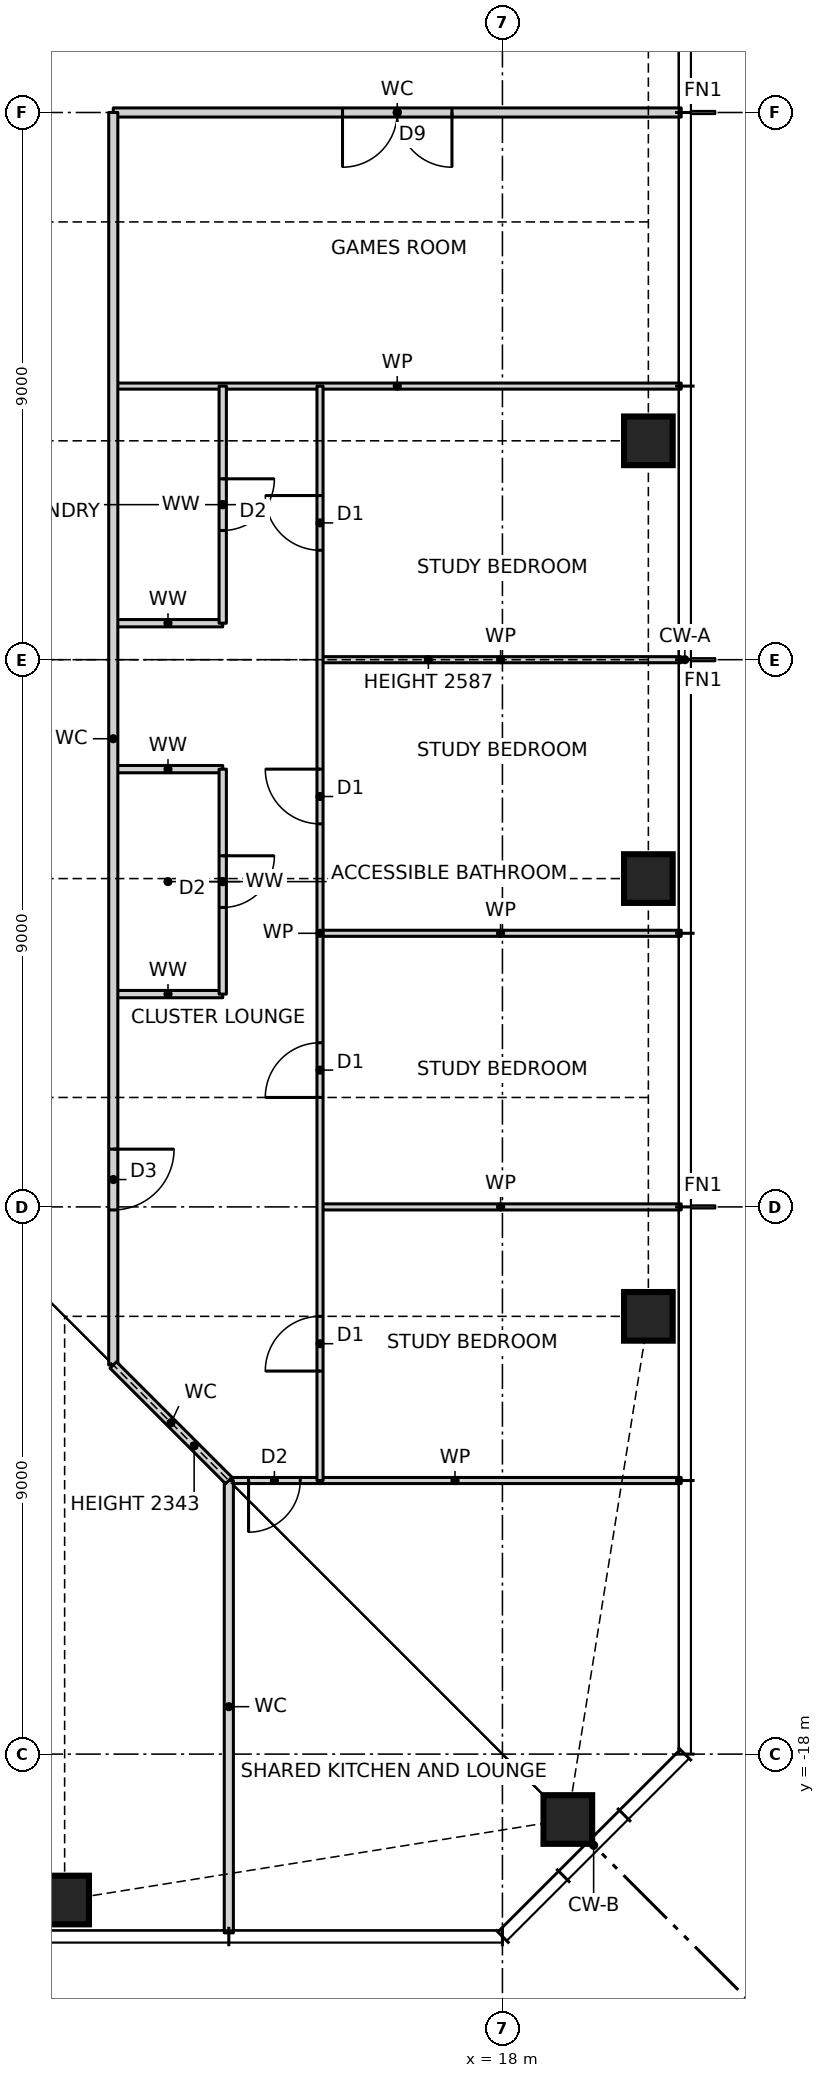
"""IFC4 building model, lengths in metres.
Left out: names, types, materials, properties, quantities, classifications, styles, units other than length and angle.
Written with IfcOpenShell. Run it as: python <this file> out.ifc"""

import sys

from ifc_helpers import new_model, si_unit, direction, frame, frame_2d, origin, origin_2d, place, context, subcontext, project, spatial, rectangle, hollow_rectangle, extrude, element, fill, save


model = new_model("IFC4")
c1 = context("Model", 3, precision=1e-05, world=origin(), true_north=direction((0.0, 1.0)))
c2 = subcontext(c1, "Body", "Model", "MODEL_VIEW")
j1 = project(units=[si_unit("LENGTHUNIT", "METRE"), si_unit("PLANEANGLEUNIT", "RADIAN")], contexts=[c1])
p1 = place(None, origin())
s1 = spatial("IfcSite", under=j1, at=p1, CompositionType="ELEMENT")
p2 = place(p1, origin())
s2 = spatial("IfcBuilding", under=s1, at=p2, CompositionType="ELEMENT")
p3 = place(p2, frame((0.0, 0.0, 112.0)))
s3 = spatial("IfcBuildingStorey", under=s2, at=p3, CompositionType="ELEMENT", Elevation=112.0)
for number, where, z_axis, x_axis in (
    (1, (10.8, -20.4, 0.0), (0.0, 0.0, 1.0), (1.0, 0.0, 0.0)),
    (2, (19.076, -19.076, 0.0), (0.0, 0.0, 1.0), (1.0, 0.0, 0.0)),
    (3, (20.4, -10.8, 0.0), (0.0, 0.0, 1.0), (1.0, 0.0, 0.0)),
    (4, (20.4, -3.6, 0.0), (0.0, 0.0, 1.0), (1.0, 0.0, 0.0)),
    (5, (20.4, 3.6, 0.0), (0.0, 0.0, 1.0), (1.0, 0.0, 0.0)),
):
    element("IfcColumn", number, at=place(p3, frame(where, z_axis=z_axis, x_axis=x_axis)), inside=s3, PredefinedType="COLUMN", context=c2, shape_type="SweptSolid", body=[
        extrude(hollow_rectangle(XDim=0.8, YDim=0.8, WallThickness=0.07, at=origin_2d()), origin(), (0.0, 0.0, 1.0), 3.5),
    ])
p4 = place(p3, frame((13.5, -13.5, 0.0), z_axis=(0.0, 0.0, 1.0), x_axis=(1.0, 0.0, 0.0)))
e6 = element("IfcWall", 6, at=p4, inside=s3, PredefinedType="PARTITIONING", context=c2, shape_type="SweptSolid", body=[
    extrude(rectangle(XDim=7.44, YDim=0.1, at=frame_2d((3.72, 0.0))), origin(), (0.0, 0.0, 1.0), 3.27),
])
p5 = place(p4, frame((0.325, 0.0, 0.0)))
e7 = element("IfcOpeningElement", 7, at=p5, cuts=e6, PredefinedType="OPENING", context=c2, shape_type="SweptSolid", body=[
    extrude(rectangle(XDim=0.85, YDim=2.1, at=frame_2d((0.425, 1.05))), frame((0.0, 0.06, 0.0), z_axis=(0.0, -1.0, 0.0), x_axis=(1.0, 0.0, 0.0)), (0.0, 0.0, 1.0), 0.12),
])
p6 = place(p3, frame((15.0, -9.0, 0.0), z_axis=(0.0, 0.0, 1.0), x_axis=(1.0, 0.0, 0.0)))
e8 = element("IfcWall", 8, at=p6, inside=s3, PredefinedType="PARTITIONING", context=c2, shape_type="SweptSolid", body=[
    extrude(rectangle(XDim=5.94, YDim=0.1, at=frame_2d((2.97, 0.0))), origin(), (0.0, 0.0, 1.0), 3.27),
])
p7 = place(p3, frame((11.6, -5.5, 0.0), z_axis=(0.0, 0.0, 1.0), x_axis=(1.0, 0.0, 0.0)))
e9 = element("IfcWall", 9, at=p7, inside=s3, PredefinedType="PARTITIONING", context=c2, shape_type="SweptSolid", body=[
    extrude(rectangle(XDim=1.8, YDim=0.12, at=frame_2d((0.9, 0.0))), origin(), (0.0, 0.0, 1.0), 3.27),
])
p8 = place(p3, frame((15.0, -4.5, 0.0), z_axis=(0.0, 0.0, 1.0), x_axis=(1.0, 0.0, 0.0)))
e10 = element("IfcWall", 10, at=p8, inside=s3, PredefinedType="PARTITIONING", context=c2, shape_type="SweptSolid", body=[
    extrude(rectangle(XDim=5.94, YDim=0.1, at=frame_2d((2.97, 0.0))), origin(), (0.0, 0.0, 1.0), 3.27),
])
p9 = place(p3, frame((11.6, -1.8, 0.0), z_axis=(0.0, 0.0, 1.0), x_axis=(1.0, 0.0, 0.0)))
e11 = element("IfcWall", 11, at=p9, inside=s3, PredefinedType="PARTITIONING", context=c2, shape_type="SweptSolid", body=[
    extrude(rectangle(XDim=1.8, YDim=0.12, at=frame_2d((0.9, 0.0))), origin(), (0.0, 0.0, 1.0), 3.27),
])
p10 = place(p3, frame((15.0, 0.0, 0.0), z_axis=(0.0, 0.0, 1.0), x_axis=(1.0, 0.0, 0.0)))
e12 = element("IfcWall", 12, at=p10, inside=s3, PredefinedType="PARTITIONING", context=c2, shape_type="SweptSolid", body=[
    extrude(rectangle(XDim=5.94, YDim=0.1, at=frame_2d((2.97, 0.0))), origin(), (0.0, 0.0, 1.0), 2.587),
])
p11 = place(p3, frame((11.6, 0.6, 0.0), z_axis=(0.0, 0.0, 1.0), x_axis=(1.0, 0.0, 0.0)))
e13 = element("IfcWall", 13, at=p11, inside=s3, PredefinedType="PARTITIONING", context=c2, shape_type="SweptSolid", body=[
    extrude(rectangle(XDim=1.8, YDim=0.12, at=frame_2d((0.9, 0.0))), origin(), (0.0, 0.0, 1.0), 3.27),
])
p12 = place(p3, frame((11.6, 4.5, 0.0), z_axis=(0.0, 0.0, 1.0), x_axis=(1.0, 0.0, 0.0)))
e14 = element("IfcWall", 14, at=p12, inside=s3, PredefinedType="PARTITIONING", context=c2, shape_type="SweptSolid", body=[
    extrude(rectangle(XDim=9.34, YDim=0.1, at=frame_2d((4.67, 0.0))), origin(), (0.0, 0.0, 1.0), 3.27),
])
p13 = place(p3, frame((11.6, 9.0, 0.0), z_axis=(0.0, 0.0, 1.0), x_axis=(1.0, 0.0, 0.0)))
e15 = element("IfcWall", 15, at=p13, inside=s3, PredefinedType="PARTITIONING", context=c2, shape_type="SweptSolid", body=[
    extrude(rectangle(XDim=9.34, YDim=0.15, at=frame_2d((4.67, 0.0))), origin(), (0.0, 0.0, 1.0), 3.27),
])
p14 = place(p13, frame((3.77, 0.0, 0.0)))
e16 = element("IfcOpeningElement", 16, at=p14, cuts=e15, PredefinedType="OPENING", context=c2, shape_type="SweptSolid", body=[
    extrude(rectangle(XDim=1.8, YDim=2.1, at=frame_2d((0.9, 1.05))), frame((0.0, 0.085, 0.0), z_axis=(0.0, -1.0, 0.0), x_axis=(1.0, 0.0, 0.0)), (0.0, 0.0, 1.0), 0.17),
])
p15 = place(p3, frame((15.0, -13.5, 0.0), z_axis=(0.0, 0.0, 1.0), x_axis=(0.0, 1.0, 0.0)))
e17 = element("IfcWall", 17, at=p15, inside=s3, PredefinedType="PARTITIONING", context=c2, shape_type="SweptSolid", body=[
    extrude(rectangle(XDim=18.0, YDim=0.1, at=frame_2d((9.0, 0.0))), origin(), (0.0, 0.0, 1.0), 3.27),
])
p16 = place(p15, frame((1.8, 0.0, 0.0)))
e18 = element("IfcOpeningElement", 18, at=p16, cuts=e17, PredefinedType="OPENING", context=c2, shape_type="SweptSolid", body=[
    extrude(rectangle(XDim=0.9, YDim=2.1, at=frame_2d((0.45, 1.05))), frame((0.0, 0.06, 0.0), z_axis=(0.0, -1.0, 0.0), x_axis=(1.0, 0.0, 0.0)), (0.0, 0.0, 1.0), 0.12),
])
p17 = place(p15, frame((6.3, 0.0, 0.0)))
e19 = element("IfcOpeningElement", 19, at=p17, cuts=e17, PredefinedType="OPENING", context=c2, shape_type="SweptSolid", body=[
    extrude(rectangle(XDim=0.9, YDim=2.1, at=frame_2d((0.45, 1.05))), frame((0.0, 0.06, 0.0), z_axis=(0.0, -1.0, 0.0), x_axis=(1.0, 0.0, 0.0)), (0.0, 0.0, 1.0), 0.12),
])
p18 = place(p15, frame((10.8, 0.0, 0.0)))
e20 = element("IfcOpeningElement", 20, at=p18, cuts=e17, PredefinedType="OPENING", context=c2, shape_type="SweptSolid", body=[
    extrude(rectangle(XDim=0.9, YDim=2.1, at=frame_2d((0.45, 1.05))), frame((0.0, 0.06, 0.0), z_axis=(0.0, -1.0, 0.0), x_axis=(1.0, 0.0, 0.0)), (0.0, 0.0, 1.0), 0.12),
])
p19 = place(p15, frame((15.3, 0.0, 0.0)))
e21 = element("IfcOpeningElement", 21, at=p19, cuts=e17, PredefinedType="OPENING", context=c2, shape_type="SweptSolid", body=[
    extrude(rectangle(XDim=0.9, YDim=2.1, at=frame_2d((0.45, 1.05))), frame((0.0, 0.06, 0.0), z_axis=(0.0, -1.0, 0.0), x_axis=(1.0, 0.0, 0.0)), (0.0, 0.0, 1.0), 0.12),
])
p20 = place(p3, frame((13.5, -20.94, 0.0), z_axis=(0.0, 0.0, 1.0), x_axis=(0.0, 1.0, 0.0)))
e22 = element("IfcWall", 22, at=p20, inside=s3, PredefinedType="PARTITIONING", context=c2, shape_type="SweptSolid", body=[
    extrude(rectangle(XDim=7.44, YDim=0.15, at=frame_2d((3.72, 0.0))), origin(), (0.0, 0.0, 1.0), 3.27),
])
p21 = place(p3, frame((13.4, -5.5, 0.0), z_axis=(0.0, 0.0, 1.0), x_axis=(0.0, 1.0, 0.0)))
e23 = element("IfcWall", 23, at=p21, inside=s3, PredefinedType="PARTITIONING", context=c2, shape_type="SweptSolid", body=[
    extrude(rectangle(XDim=3.7, YDim=0.12, at=frame_2d((1.85, 0.0))), origin(), (0.0, 0.0, 1.0), 3.27),
])
p22 = place(p21, frame((1.425, 0.0, 0.0)))
e24 = element("IfcOpeningElement", 24, at=p22, cuts=e23, PredefinedType="OPENING", context=c2, shape_type="SweptSolid", body=[
    extrude(rectangle(XDim=0.85, YDim=2.1, at=frame_2d((0.425, 1.05))), frame((0.0, 0.07, 0.0), z_axis=(0.0, -1.0, 0.0), x_axis=(1.0, 0.0, 0.0)), (0.0, 0.0, 1.0), 0.14),
])
p23 = place(p3, frame((13.4, 0.6, 0.0), z_axis=(0.0, 0.0, 1.0), x_axis=(0.0, 1.0, 0.0)))
e25 = element("IfcWall", 25, at=p23, inside=s3, PredefinedType="PARTITIONING", context=c2, shape_type="SweptSolid", body=[
    extrude(rectangle(XDim=3.9, YDim=0.12, at=frame_2d((1.95, 0.0))), origin(), (0.0, 0.0, 1.0), 3.27),
])
p24 = place(p23, frame((1.525, 0.0, 0.0)))
e26 = element("IfcOpeningElement", 26, at=p24, cuts=e25, PredefinedType="OPENING", context=c2, shape_type="SweptSolid", body=[
    extrude(rectangle(XDim=0.85, YDim=2.1, at=frame_2d((0.425, 1.05))), frame((0.0, 0.07, 0.0), z_axis=(0.0, -1.0, 0.0), x_axis=(1.0, 0.0, 0.0)), (0.0, 0.0, 1.0), 0.14),
])
p25 = place(p3, frame((11.6, -11.6, 0.0), z_axis=(0.0, 0.0, 1.0), x_axis=(0.0, 1.0, 0.0)))
e27 = element("IfcWall", 27, at=p25, inside=s3, PredefinedType="PARTITIONING", context=c2, shape_type="SweptSolid", body=[
    extrude(rectangle(XDim=20.6, YDim=0.15, at=frame_2d((10.3, 0.0))), origin(), (0.0, 0.0, 1.0), 3.27),
])
p26 = place(p25, frame((2.55, 0.0, 0.0)))
e28 = element("IfcOpeningElement", 28, at=p26, cuts=e27, PredefinedType="OPENING", context=c2, shape_type="SweptSolid", body=[
    extrude(rectangle(XDim=1.0, YDim=2.1, at=frame_2d((0.5, 1.05))), frame((0.0, 0.085, 0.0), z_axis=(0.0, -1.0, 0.0), x_axis=(1.0, 0.0, 0.0)), (0.0, 0.0, 1.0), 0.17),
])
p27 = place(p3, frame((13.5, -13.5, 0.0), z_axis=(0.0, 0.0, 1.0), x_axis=(-0.707106781187, 0.707106781187, 0.0)))
e29 = element("IfcWall", 29, at=p27, inside=s3, PredefinedType="PARTITIONING", context=c2, shape_type="SweptSolid", body=[
    extrude(rectangle(XDim=2.687, YDim=0.15, at=frame_2d((1.343, 0.0))), origin(), (0.0, 0.0, 1.0), 2.343),
])
p28 = place(p16, origin())
e30 = element("IfcDoor", 30, at=p28, inside=s3, OperationType="SINGLE_SWING_LEFT", PredefinedType="DOOR", context=c2, shape_type="SweptSolid", body=[
    extrude(rectangle(XDim=0.9, YDim=2.1, at=frame_2d((0.45, 1.05))), frame((0.0, 0.025, 0.0), z_axis=(0.0, -1.0, 0.0), x_axis=(1.0, 0.0, 0.0)), (0.0, 0.0, 1.0), 0.05),
])
fill(e18, e30)
p29 = place(p17, origin())
e31 = element("IfcDoor", 31, at=p29, inside=s3, OperationType="SINGLE_SWING_LEFT", PredefinedType="DOOR", context=c2, shape_type="SweptSolid", body=[
    extrude(rectangle(XDim=0.9, YDim=2.1, at=frame_2d((0.45, 1.05))), frame((0.0, 0.025, 0.0), z_axis=(0.0, -1.0, 0.0), x_axis=(1.0, 0.0, 0.0)), (0.0, 0.0, 1.0), 0.05),
])
fill(e19, e31)
p30 = place(p18, origin())
e32 = element("IfcDoor", 32, at=p30, inside=s3, OperationType="SINGLE_SWING_RIGHT", PredefinedType="DOOR", context=c2, shape_type="SweptSolid", body=[
    extrude(rectangle(XDim=0.9, YDim=2.1, at=frame_2d((0.45, 1.05))), frame((0.0, 0.025, 0.0), z_axis=(0.0, -1.0, 0.0), x_axis=(1.0, 0.0, 0.0)), (0.0, 0.0, 1.0), 0.05),
])
fill(e20, e32)
p31 = place(p19, origin())
e33 = element("IfcDoor", 33, at=p31, inside=s3, OperationType="SINGLE_SWING_RIGHT", PredefinedType="DOOR", context=c2, shape_type="SweptSolid", body=[
    extrude(rectangle(XDim=0.9, YDim=2.1, at=frame_2d((0.45, 1.05))), frame((0.0, 0.025, 0.0), z_axis=(0.0, -1.0, 0.0), x_axis=(1.0, 0.0, 0.0)), (0.0, 0.0, 1.0), 0.05),
])
fill(e21, e33)
p32 = place(p26, frame((1.0, 0.0, 0.0), z_axis=(0.0, 0.0, 1.0), x_axis=(-1.0, 0.0, 0.0)))
e34 = element("IfcDoor", 34, at=p32, inside=s3, OperationType="SINGLE_SWING_LEFT", PredefinedType="DOOR", context=c2, shape_type="SweptSolid", body=[
    extrude(rectangle(XDim=1.0, YDim=2.1, at=frame_2d((0.5, 1.05))), frame((0.0, 0.025, 0.0), z_axis=(0.0, -1.0, 0.0), x_axis=(1.0, 0.0, 0.0)), (0.0, 0.0, 1.0), 0.05),
])
fill(e28, e34)
p33 = place(p22, frame((0.85, 0.0, 0.0), z_axis=(0.0, 0.0, 1.0), x_axis=(-1.0, 0.0, 0.0)))
e35 = element("IfcDoor", 35, at=p33, inside=s3, OperationType="SINGLE_SWING_LEFT", PredefinedType="DOOR", context=c2, shape_type="SweptSolid", body=[
    extrude(rectangle(XDim=0.85, YDim=2.1, at=frame_2d((0.425, 1.05))), frame((0.0, 0.025, 0.0), z_axis=(0.0, -1.0, 0.0), x_axis=(1.0, 0.0, 0.0)), (0.0, 0.0, 1.0), 0.05),
])
fill(e24, e35)
p34 = place(p24, frame((0.85, 0.0, 0.0), z_axis=(0.0, 0.0, 1.0), x_axis=(-1.0, 0.0, 0.0)))
e36 = element("IfcDoor", 36, at=p34, inside=s3, OperationType="SINGLE_SWING_LEFT", PredefinedType="DOOR", context=c2, shape_type="SweptSolid", body=[
    extrude(rectangle(XDim=0.85, YDim=2.1, at=frame_2d((0.425, 1.05))), frame((0.0, 0.025, 0.0), z_axis=(0.0, -1.0, 0.0), x_axis=(1.0, 0.0, 0.0)), (0.0, 0.0, 1.0), 0.05),
])
fill(e26, e36)
p35 = place(p14, frame((1.8, 0.0, 0.0), z_axis=(0.0, 0.0, 1.0), x_axis=(-1.0, 0.0, 0.0)))
e37 = element("IfcDoor", 37, at=p35, inside=s3, OperationType="DOUBLE_DOOR_SINGLE_SWING", PredefinedType="DOOR", context=c2, shape_type="SweptSolid", body=[
    extrude(rectangle(XDim=1.8, YDim=2.1, at=frame_2d((0.9, 1.05))), frame((0.0, 0.025, 0.0), z_axis=(0.0, -1.0, 0.0), x_axis=(1.0, 0.0, 0.0)), (0.0, 0.0, 1.0), 0.05),
])
fill(e16, e37)
p36 = place(p5, frame((0.85, 0.0, 0.0), z_axis=(0.0, 0.0, 1.0), x_axis=(-1.0, 0.0, 0.0)))
e38 = element("IfcDoor", 38, at=p36, inside=s3, OperationType="SINGLE_SWING_RIGHT", PredefinedType="DOOR", context=c2, shape_type="SweptSolid", body=[
    extrude(rectangle(XDim=0.85, YDim=2.1, at=frame_2d((0.425, 1.05))), frame((0.0, 0.025, 0.0), z_axis=(0.0, -1.0, 0.0), x_axis=(1.0, 0.0, 0.0)), (0.0, 0.0, 1.0), 0.05),
])
fill(e7, e38)
save(model, sys.argv[1])
